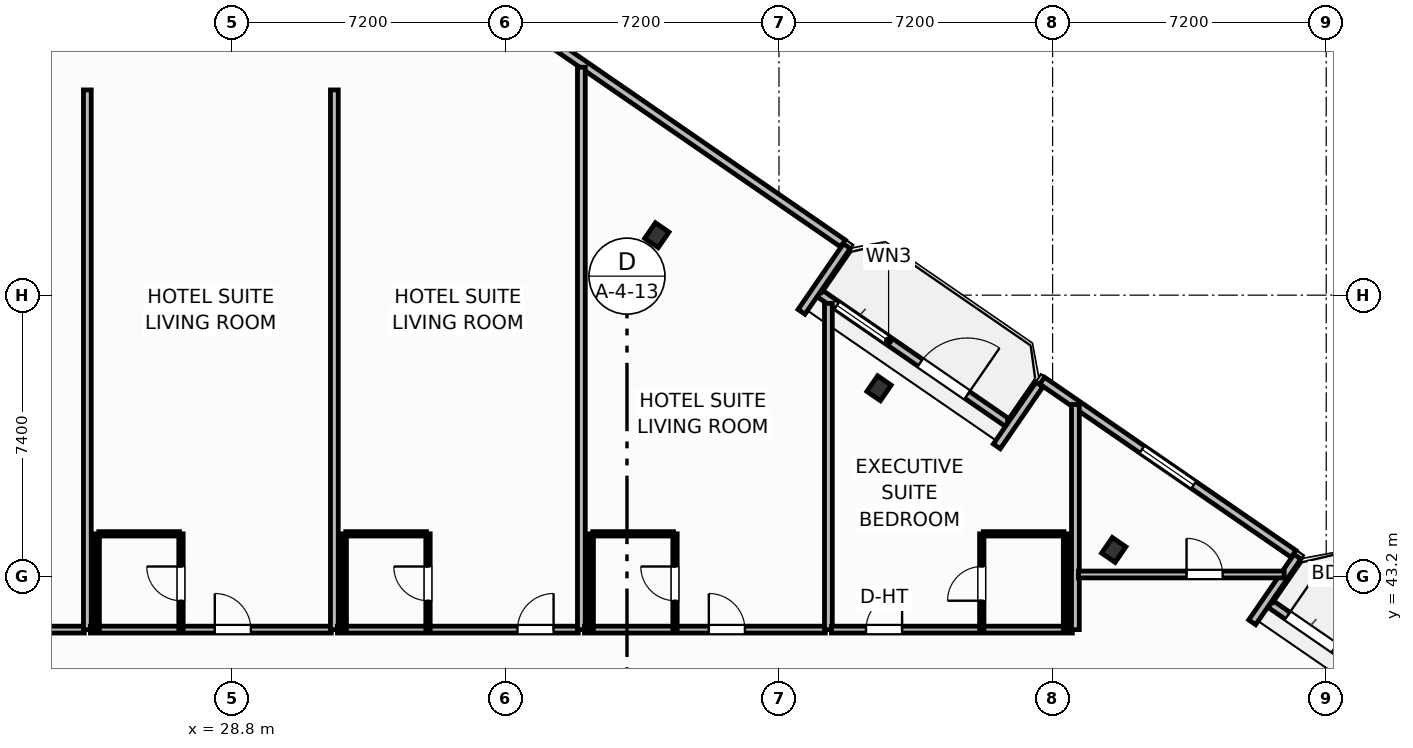
"""IFC4 building model, lengths in metres.
Left out: names, types, materials, properties, quantities, classifications, styles, units other than length and angle.
Written with IfcOpenShell. Run it as: python <this file> out.ifc"""

import sys

from ifc_helpers import new_model, si_unit, direction, frame, frame_2d, origin, origin_2d, place, context, subcontext, project, spatial, rectangle, i_section, extrude, element, fill, save


model = new_model("IFC4")
c1 = context("Model", 3, precision=1e-05, world=origin(), true_north=direction((0.0, 1.0)))
c2 = subcontext(c1, "Body", "Model", "MODEL_VIEW")
j1 = project(units=[si_unit("LENGTHUNIT", "METRE"), si_unit("PLANEANGLEUNIT", "RADIAN")], contexts=[c1])
p1 = place(None, origin())
s1 = spatial("IfcSite", under=j1, at=p1, CompositionType="ELEMENT")
p2 = place(p1, origin())
s2 = spatial("IfcBuilding", under=s1, at=p2, CompositionType="ELEMENT")
p3 = place(p2, frame((0.0, 0.0, 67.7)))
s3 = spatial("IfcBuildingStorey", under=s2, at=p3, CompositionType="ELEMENT", Elevation=67.7)
for number, where, z_axis, x_axis in (
    (1, (52.009, 43.896, 0.0), (0.0, 0.0, 1.0), (0.824, -0.567, 0.0)),
    (2, (45.833, 48.15, 0.0), (0.0, 0.0, 1.0), (0.824, -0.567, 0.0)),
    (3, (39.985, 52.177, 0.0), (0.0, 0.0, 1.0), (0.824, -0.567, 0.0)),
):
    element("IfcColumn", number, at=place(p3, frame(where, z_axis=z_axis, x_axis=x_axis)), inside=s3, PredefinedType="COLUMN", context=c2, shape_type="SweptSolid", body=[
        extrude(i_section(OverallWidth=0.432, OverallDepth=0.498, WebThickness=0.056, FlangeThickness=0.089, FilletRadius=0.025, at=origin_2d()), origin(), (0.0, 0.0, 1.0), 3.7),
    ])
p4 = place(p3, frame((44.273, 50.645, 0.0), z_axis=(0.0, 0.0, 1.0), x_axis=(0.823534636215, -0.567265989598, 0.0)))
e4 = element("IfcWall", 4, at=p4, inside=s3, PredefinedType="SOLIDWALL", context=c2, shape_type="SweptSolid", body=[
    extrude(rectangle(XDim=6.0, YDim=0.22, at=frame_2d((3.0, 0.0))), origin(), (0.0, 0.0, 1.0), 2.66),
])
p5 = place(p4, frame((3.212, 0.0, 0.0)))
e5 = element("IfcOpeningElement", 5, at=p5, cuts=e4, PredefinedType="OPENING", context=c2, shape_type="SweptSolid", body=[
    extrude(rectangle(XDim=1.5, YDim=2.25, at=frame_2d((0.75, 1.125))), frame((0.0, 0.12, 0.0), z_axis=(0.0, -1.0, 0.0), x_axis=(1.0, 0.0, 0.0)), (0.0, 0.0, 1.0), 0.24),
])
p6 = place(p4, frame((0.55, 0.0, 0.75)))
e6 = element("IfcOpeningElement", 6, at=p6, cuts=e4, PredefinedType="OPENING", context=c2, shape_type="SweptSolid", body=[
    extrude(rectangle(XDim=1.65, YDim=1.65, at=frame_2d((0.825, 0.825))), frame((0.0, 0.12, 0.0), z_axis=(0.0, -1.0, 0.0), x_axis=(1.0, 0.0, 0.0)), (0.0, 0.0, 1.0), 0.24),
])
p7 = place(p3, frame((56.132, 42.476, 0.0), z_axis=(0.0, 0.0, 1.0), x_axis=(0.823534636215, -0.567265989598, 0.0)))
e7 = element("IfcWall", 7, at=p7, inside=s3, PredefinedType="SOLIDWALL", context=c2, shape_type="SweptSolid", body=[
    extrude(rectangle(XDim=6.0, YDim=0.22, at=frame_2d((3.0, 0.0))), origin(), (0.0, 0.0, 1.0), 2.66),
])
p8 = place(p7, frame((0.548, 0.0, 0.0)))
e8 = element("IfcOpeningElement", 8, at=p8, cuts=e7, PredefinedType="OPENING", context=c2, shape_type="SweptSolid", body=[
    extrude(rectangle(XDim=1.5, YDim=2.25, at=frame_2d((0.75, 1.125))), frame((0.0, 0.12, 0.0), z_axis=(0.0, -1.0, 0.0), x_axis=(1.0, 0.0, 0.0)), (0.0, 0.0, 1.0), 0.24),
])
p9 = place(p3, frame((55.653, 41.993, 0.0), z_axis=(0.0, 0.0, 1.0), x_axis=(0.567273696173, 0.823529327729, 0.0)))
e9 = element("IfcWall", 9, at=p9, inside=s3, PredefinedType="SOLIDWALL", context=c2, shape_type="SweptSolid", body=[
    extrude(rectangle(XDim=2.1, YDim=0.22, at=frame_2d((1.05, 0.0))), origin(), (0.0, 0.0, 1.0), 2.66),
])
p10 = place(p3, frame((56.741, 43.793, 0.0), z_axis=(0.0, 0.0, 1.0), x_axis=(-0.823530942962, 0.56727135128, 0.0)))
e10 = element("IfcWall", 10, at=p10, inside=s3, PredefinedType="SOLIDWALL", context=c2, shape_type="SweptSolid", body=[
    extrude(rectangle(XDim=8.035, YDim=0.22, at=frame_2d((4.018, 0.0))), origin(), (0.0, 0.0, 1.0), 2.66),
])
p11 = place(p10, frame((3.192, 0.0, 0.8)))
e11 = element("IfcOpeningElement", 11, at=p11, cuts=e10, PredefinedType="OPENING", context=c2, shape_type="SweptSolid", body=[
    extrude(rectangle(XDim=1.65, YDim=1.65, at=frame_2d((0.825, 0.825))), frame((0.0, 0.12, 0.0), z_axis=(0.0, -1.0, 0.0), x_axis=(1.0, 0.0, 0.0)), (0.0, 0.0, 1.0), 0.24),
])
p12 = place(p3, frame((50.053, 48.248, 0.0), z_axis=(0.0, 0.0, 1.0), x_axis=(-0.567273565974, -0.823529417415, 0.0)))
e12 = element("IfcWall", 12, at=p12, inside=s3, PredefinedType="SOLIDWALL", context=c2, shape_type="SweptSolid", body=[
    extrude(rectangle(XDim=1.975, YDim=0.22, at=frame_2d((0.988, 0.0))), origin(), (0.0, 0.0, 1.0), 2.66),
])
p13 = place(p3, frame((43.794, 50.161, 0.0), z_axis=(0.0, 0.0, 1.0), x_axis=(0.567352541689, 0.823475010816, 0.0)))
e13 = element("IfcWall", 13, at=p13, inside=s3, PredefinedType="SOLIDWALL", context=c2, shape_type="SweptSolid", body=[
    extrude(rectangle(XDim=2.1, YDim=0.22, at=frame_2d((1.05, 0.0))), origin(), (0.0, 0.0, 1.0), 2.66),
])
p14 = place(p3, frame((44.882, 51.962, 0.0), z_axis=(0.0, 0.0, 1.0), x_axis=(-0.823534427573, 0.567266292497, 0.0)))
e14 = element("IfcWall", 14, at=p14, inside=s3, PredefinedType="SOLIDWALL", context=c2, shape_type="SweptSolid", body=[
    extrude(rectangle(XDim=23.147, YDim=0.22, at=frame_2d((11.574, 0.0))), origin(), (0.0, 0.0, 1.0), 2.66),
])
p15 = place(p14, frame((10.749, 0.0, 0.8)))
e15 = element("IfcOpeningElement", 15, at=p15, cuts=e14, PredefinedType="OPENING", context=c2, shape_type="SweptSolid", body=[
    extrude(rectangle(XDim=1.65, YDim=1.65, at=frame_2d((0.825, 0.825))), frame((0.0, 0.12, 0.0), z_axis=(0.0, -1.0, 0.0), x_axis=(1.0, 0.0, 0.0)), (0.0, 0.0, 1.0), 0.24),
])
p16 = place(p3, frame((3.176, 41.8, 0.0), z_axis=(0.0, 0.0, 1.0), x_axis=(1.0, 0.0, 0.0)))
e16 = element("IfcWall", 16, at=p16, inside=s3, PredefinedType="PARTITIONING", context=c2, shape_type="SweptSolid", body=[
    extrude(rectangle(XDim=21.744, YDim=0.18, at=frame_2d((10.872, 0.0))), origin(), (0.0, 0.0, 1.0), 3.38),
])
p17 = place(p16, frame((16.689, 0.0, 0.0)))
e17 = element("IfcOpeningElement", 17, at=p17, cuts=e16, PredefinedType="OPENING", context=c2, shape_type="SweptSolid", body=[
    extrude(rectangle(XDim=0.95, YDim=2.05, at=frame_2d((0.475, 1.025))), frame((0.0, 0.1, 0.0), z_axis=(0.0, -1.0, 0.0), x_axis=(1.0, 0.0, 0.0)), (0.0, 0.0, 1.0), 0.2),
])
p18 = place(p3, frame((25.0, 41.8, 0.0), z_axis=(0.0, 0.0, 1.0), x_axis=(0.0, 1.0, 0.0)))
e18 = element("IfcWall", 18, at=p18, inside=s3, PredefinedType="PARTITIONING", context=c2, shape_type="SweptSolid", body=[
    extrude(rectangle(XDim=14.2, YDim=0.205, at=frame_2d((7.1, 0.0))), origin(), (0.0, 0.0, 1.0), 3.38),
])
p19 = place(p3, frame((25.08, 41.8, 0.0), z_axis=(0.0, 0.0, 1.0), x_axis=(1.0, 0.0, 0.0)))
e19 = element("IfcWall", 19, at=p19, inside=s3, PredefinedType="PARTITIONING", context=c2, shape_type="SweptSolid", body=[
    extrude(rectangle(XDim=6.34, YDim=0.18, at=frame_2d((3.17, 0.0))), origin(), (0.0, 0.0, 1.0), 3.38),
])
p20 = place(p19, frame((3.274, 0.0, 0.0)))
e20 = element("IfcOpeningElement", 20, at=p20, cuts=e19, PredefinedType="OPENING", context=c2, shape_type="SweptSolid", body=[
    extrude(rectangle(XDim=0.95, YDim=2.15, at=frame_2d((0.475, 1.075))), frame((0.0, 0.1, 0.0), z_axis=(0.0, -1.0, 0.0), x_axis=(1.0, 0.0, 0.0)), (0.0, 0.0, 1.0), 0.2),
])
p21 = place(p3, frame((25.3, 44.32, 0.0), z_axis=(0.0, 0.0, 1.0), x_axis=(1.0, 0.0, 0.0)))
e21 = element("IfcWall", 21, at=p21, inside=s3, PredefinedType="PARTITIONING", context=c2, shape_type="SweptSolid", body=[
    extrude(rectangle(XDim=2.124, YDim=0.115, at=frame_2d((1.062, 0.0))), origin(), (0.0, 0.0, 1.0), 3.38),
])
p22 = place(p3, frame((27.464, 41.8, 0.0), z_axis=(0.0, 0.0, 1.0), x_axis=(0.0, 1.0, 0.0)))
e22 = element("IfcWall", 22, at=p22, inside=s3, PredefinedType="PARTITIONING", context=c2, shape_type="SweptSolid", body=[
    extrude(rectangle(XDim=2.52, YDim=0.115, at=frame_2d((1.26, 0.0))), origin(), (0.0, 0.0, 1.0), 3.38),
])
p23 = place(p22, frame((0.76, 0.0, 0.0)))
e23 = element("IfcOpeningElement", 23, at=p23, cuts=e22, PredefinedType="OPENING", context=c2, shape_type="SweptSolid", body=[
    extrude(rectangle(XDim=0.9, YDim=2.05, at=frame_2d((0.45, 1.025))), frame((0.0, 0.067, 0.0), z_axis=(0.0, -1.0, 0.0), x_axis=(1.0, 0.0, 0.0)), (0.0, 0.0, 1.0), 0.135),
])
p24 = place(p3, frame((25.26, 41.8, 0.0), z_axis=(0.0, 0.0, 1.0), x_axis=(0.0, 1.0, 0.0)))
e24 = element("IfcWall", 24, at=p24, inside=s3, PredefinedType="PARTITIONING", context=c2, shape_type="SweptSolid", body=[
    extrude(rectangle(XDim=2.52, YDim=0.115, at=frame_2d((1.26, 0.0))), origin(), (0.0, 0.0, 1.0), 3.38),
])
p25 = place(p3, frame((31.5, 41.8, 0.0), z_axis=(0.0, 0.0, 1.0), x_axis=(0.0, 1.0, 0.0)))
e25 = element("IfcWall", 25, at=p25, inside=s3, PredefinedType="PARTITIONING", context=c2, shape_type="SweptSolid", body=[
    extrude(rectangle(XDim=14.2, YDim=0.205, at=frame_2d((7.1, 0.0))), origin(), (0.0, 0.0, 1.0), 3.38),
])
p26 = place(p3, frame((31.58, 41.8, 0.0), z_axis=(0.0, 0.0, 1.0), x_axis=(1.0, 0.0, 0.0)))
e26 = element("IfcWall", 26, at=p26, inside=s3, PredefinedType="PARTITIONING", context=c2, shape_type="SweptSolid", body=[
    extrude(rectangle(XDim=6.34, YDim=0.18, at=frame_2d((3.17, 0.0))), origin(), (0.0, 0.0, 1.0), 3.38),
])
p27 = place(p26, frame((4.739, 0.0, 0.0)))
e27 = element("IfcOpeningElement", 27, at=p27, cuts=e26, PredefinedType="OPENING", context=c2, shape_type="SweptSolid", body=[
    extrude(rectangle(XDim=0.95, YDim=2.15, at=frame_2d((0.475, 1.075))), frame((0.0, 0.1, 0.0), z_axis=(0.0, -1.0, 0.0), x_axis=(1.0, 0.0, 0.0)), (0.0, 0.0, 1.0), 0.2),
])
p28 = place(p3, frame((31.8, 44.32, 0.0), z_axis=(0.0, 0.0, 1.0), x_axis=(1.0, 0.0, 0.0)))
e28 = element("IfcWall", 28, at=p28, inside=s3, PredefinedType="PARTITIONING", context=c2, shape_type="SweptSolid", body=[
    extrude(rectangle(XDim=2.124, YDim=0.115, at=frame_2d((1.062, 0.0))), origin(), (0.0, 0.0, 1.0), 3.38),
])
p29 = place(p3, frame((33.964, 41.8, 0.0), z_axis=(0.0, 0.0, 1.0), x_axis=(0.0, 1.0, 0.0)))
e29 = element("IfcWall", 29, at=p29, inside=s3, PredefinedType="PARTITIONING", context=c2, shape_type="SweptSolid", body=[
    extrude(rectangle(XDim=2.52, YDim=0.115, at=frame_2d((1.26, 0.0))), origin(), (0.0, 0.0, 1.0), 3.38),
])
p30 = place(p29, frame((0.76, 0.0, 0.0)))
e30 = element("IfcOpeningElement", 30, at=p30, cuts=e29, PredefinedType="OPENING", context=c2, shape_type="SweptSolid", body=[
    extrude(rectangle(XDim=0.9, YDim=2.05, at=frame_2d((0.45, 1.025))), frame((0.0, 0.067, 0.0), z_axis=(0.0, -1.0, 0.0), x_axis=(1.0, 0.0, 0.0)), (0.0, 0.0, 1.0), 0.135),
])
p31 = place(p3, frame((31.76, 41.8, 0.0), z_axis=(0.0, 0.0, 1.0), x_axis=(0.0, 1.0, 0.0)))
e31 = element("IfcWall", 31, at=p31, inside=s3, PredefinedType="PARTITIONING", context=c2, shape_type="SweptSolid", body=[
    extrude(rectangle(XDim=2.52, YDim=0.115, at=frame_2d((1.26, 0.0))), origin(), (0.0, 0.0, 1.0), 3.38),
])
p32 = place(p3, frame((38.0, 41.8, 0.0), z_axis=(0.0, 0.0, 1.0), x_axis=(0.0, 1.0, 0.0)))
e32 = element("IfcWall", 32, at=p32, inside=s3, PredefinedType="PARTITIONING", context=c2, shape_type="SweptSolid", body=[
    extrude(rectangle(XDim=14.797, YDim=0.205, at=frame_2d((7.398, 0.0))), origin(), (0.0, 0.0, 1.0), 3.38),
])
p33 = place(p3, frame((38.08, 41.8, 0.0), z_axis=(0.0, 0.0, 1.0), x_axis=(1.0, 0.0, 0.0)))
e33 = element("IfcWall", 33, at=p33, inside=s3, PredefinedType="PARTITIONING", context=c2, shape_type="SweptSolid", body=[
    extrude(rectangle(XDim=6.34, YDim=0.18, at=frame_2d((3.17, 0.0))), origin(), (0.0, 0.0, 1.0), 3.38),
])
p34 = place(p33, frame((3.274, 0.0, 0.0)))
e34 = element("IfcOpeningElement", 34, at=p34, cuts=e33, PredefinedType="OPENING", context=c2, shape_type="SweptSolid", body=[
    extrude(rectangle(XDim=0.95, YDim=2.15, at=frame_2d((0.475, 1.075))), frame((0.0, 0.1, 0.0), z_axis=(0.0, -1.0, 0.0), x_axis=(1.0, 0.0, 0.0)), (0.0, 0.0, 1.0), 0.2),
])
p35 = place(p3, frame((38.3, 44.32, 0.0), z_axis=(0.0, 0.0, 1.0), x_axis=(1.0, 0.0, 0.0)))
e35 = element("IfcWall", 35, at=p35, inside=s3, PredefinedType="PARTITIONING", context=c2, shape_type="SweptSolid", body=[
    extrude(rectangle(XDim=2.124, YDim=0.115, at=frame_2d((1.062, 0.0))), origin(), (0.0, 0.0, 1.0), 3.38),
])
p36 = place(p3, frame((40.464, 41.8, 0.0), z_axis=(0.0, 0.0, 1.0), x_axis=(0.0, 1.0, 0.0)))
e36 = element("IfcWall", 36, at=p36, inside=s3, PredefinedType="PARTITIONING", context=c2, shape_type="SweptSolid", body=[
    extrude(rectangle(XDim=2.52, YDim=0.115, at=frame_2d((1.26, 0.0))), origin(), (0.0, 0.0, 1.0), 3.38),
])
p37 = place(p36, frame((0.76, 0.0, 0.0)))
e37 = element("IfcOpeningElement", 37, at=p37, cuts=e36, PredefinedType="OPENING", context=c2, shape_type="SweptSolid", body=[
    extrude(rectangle(XDim=0.9, YDim=2.05, at=frame_2d((0.45, 1.025))), frame((0.0, 0.067, 0.0), z_axis=(0.0, -1.0, 0.0), x_axis=(1.0, 0.0, 0.0)), (0.0, 0.0, 1.0), 0.135),
])
p38 = place(p3, frame((38.26, 41.8, 0.0), z_axis=(0.0, 0.0, 1.0), x_axis=(0.0, 1.0, 0.0)))
e38 = element("IfcWall", 38, at=p38, inside=s3, PredefinedType="PARTITIONING", context=c2, shape_type="SweptSolid", body=[
    extrude(rectangle(XDim=2.52, YDim=0.115, at=frame_2d((1.26, 0.0))), origin(), (0.0, 0.0, 1.0), 3.38),
])
p39 = place(p3, frame((44.5, 41.8, 0.0), z_axis=(0.0, 0.0, 1.0), x_axis=(0.0, 1.0, 0.0)))
e39 = element("IfcWall", 39, at=p39, inside=s3, PredefinedType="PARTITIONING", context=c2, shape_type="SweptSolid", body=[
    extrude(rectangle(XDim=8.583, YDim=0.205, at=frame_2d((4.292, 0.0))), origin(), (0.0, 0.0, 1.0), 3.38),
])
p40 = place(p3, frame((44.58, 41.8, 0.0), z_axis=(0.0, 0.0, 1.0), x_axis=(1.0, 0.0, 0.0)))
e40 = element("IfcWall", 40, at=p40, inside=s3, PredefinedType="PARTITIONING", context=c2, shape_type="SweptSolid", body=[
    extrude(rectangle(XDim=6.34, YDim=0.18, at=frame_2d((3.17, 0.0))), origin(), (0.0, 0.0, 1.0), 3.38),
])
p41 = place(p40, frame((0.91, 0.0, 0.0)))
e41 = element("IfcOpeningElement", 41, at=p41, cuts=e40, PredefinedType="OPENING", context=c2, shape_type="SweptSolid", body=[
    extrude(rectangle(XDim=0.95, YDim=2.15, at=frame_2d((0.475, 1.075))), frame((0.0, 0.1, 0.0), z_axis=(0.0, -1.0, 0.0), x_axis=(1.0, 0.0, 0.0)), (0.0, 0.0, 1.0), 0.2),
])
p42 = place(p3, frame((48.576, 44.32, 0.0), z_axis=(0.0, 0.0, 1.0), x_axis=(1.0, 0.0, 0.0)))
e42 = element("IfcWall", 42, at=p42, inside=s3, PredefinedType="PARTITIONING", context=c2, shape_type="SweptSolid", body=[
    extrude(rectangle(XDim=2.124, YDim=0.115, at=frame_2d((1.062, 0.0))), origin(), (0.0, 0.0, 1.0), 3.38),
])
p43 = place(p3, frame((48.536, 41.8, 0.0), z_axis=(0.0, 0.0, 1.0), x_axis=(0.0, 1.0, 0.0)))
e43 = element("IfcWall", 43, at=p43, inside=s3, PredefinedType="PARTITIONING", context=c2, shape_type="SweptSolid", body=[
    extrude(rectangle(XDim=2.52, YDim=0.115, at=frame_2d((1.26, 0.0))), origin(), (0.0, 0.0, 1.0), 3.38),
])
p44 = place(p43, frame((0.76, 0.0, 0.0)))
e44 = element("IfcOpeningElement", 44, at=p44, cuts=e43, PredefinedType="OPENING", context=c2, shape_type="SweptSolid", body=[
    extrude(rectangle(XDim=0.9, YDim=2.05, at=frame_2d((0.45, 1.025))), frame((0.0, 0.067, 0.0), z_axis=(0.0, -1.0, 0.0), x_axis=(1.0, 0.0, 0.0)), (0.0, 0.0, 1.0), 0.135),
])
p45 = place(p3, frame((50.74, 41.8, 0.0), z_axis=(0.0, 0.0, 1.0), x_axis=(0.0, 1.0, 0.0)))
e45 = element("IfcWall", 45, at=p45, inside=s3, PredefinedType="PARTITIONING", context=c2, shape_type="SweptSolid", body=[
    extrude(rectangle(XDim=2.52, YDim=0.115, at=frame_2d((1.26, 0.0))), origin(), (0.0, 0.0, 1.0), 3.38),
])
p46 = place(p3, frame((51.0, 41.8, 0.0), z_axis=(0.0, 0.0, 1.0), x_axis=(0.0, 1.0, 0.0)))
e46 = element("IfcWall", 46, at=p46, inside=s3, PredefinedType="PARTITIONING", context=c2, shape_type="SweptSolid", body=[
    extrude(rectangle(XDim=5.923, YDim=0.205, at=frame_2d((2.961, 0.0))), origin(), (0.0, 0.0, 1.0), 3.38),
])
p47 = place(p3, frame((51.08, 43.25, 0.0), z_axis=(0.0, 0.0, 1.0), x_axis=(1.0, 0.0, 0.0)))
e47 = element("IfcWall", 47, at=p47, inside=s3, PredefinedType="PARTITIONING", context=c2, shape_type="SweptSolid", body=[
    extrude(rectangle(XDim=5.414, YDim=0.18, at=frame_2d((2.707, 0.0))), origin(), (0.0, 0.0, 1.0), 3.38),
])
p48 = place(p47, frame((2.844, 0.0, 0.0)))
e48 = element("IfcOpeningElement", 48, at=p48, cuts=e47, PredefinedType="OPENING", context=c2, shape_type="SweptSolid", body=[
    extrude(rectangle(XDim=0.95, YDim=2.05, at=frame_2d((0.475, 1.025))), frame((0.0, 0.1, 0.0), z_axis=(0.0, -1.0, 0.0), x_axis=(1.0, 0.0, 0.0)), (0.0, 0.0, 1.0), 0.2),
])
p49 = place(p5, origin())
e49 = element("IfcDoor", 49, at=p49, inside=s3, OperationType="SINGLE_SWING_RIGHT", PredefinedType="DOOR", context=c2, shape_type="SweptSolid", body=[
    extrude(rectangle(XDim=1.5, YDim=2.25, at=frame_2d((0.75, 1.125))), frame((0.0, 0.025, 0.0), z_axis=(0.0, -1.0, 0.0), x_axis=(1.0, 0.0, 0.0)), (0.0, 0.0, 1.0), 0.05),
])
fill(e5, e49)
p50 = place(p6, origin())
e50 = element("IfcWindow", 50, at=p50, inside=s3, PartitioningType="SINGLE_PANEL", PredefinedType="WINDOW", context=c2, shape_type="SweptSolid", body=[
    extrude(rectangle(XDim=1.65, YDim=1.65, at=frame_2d((0.825, 0.825))), frame((0.0, 0.03, 0.0), z_axis=(0.0, -1.0, 0.0), x_axis=(1.0, 0.0, 0.0)), (0.0, 0.0, 1.0), 0.06),
])
fill(e6, e50)
p51 = place(p8, origin())
e51 = element("IfcDoor", 51, at=p51, inside=s3, OperationType="SINGLE_SWING_LEFT", PredefinedType="DOOR", context=c2, shape_type="SweptSolid", body=[
    extrude(rectangle(XDim=1.5, YDim=2.25, at=frame_2d((0.75, 1.125))), frame((0.0, 0.025, 0.0), z_axis=(0.0, -1.0, 0.0), x_axis=(1.0, 0.0, 0.0)), (0.0, 0.0, 1.0), 0.05),
])
fill(e8, e51)
p52 = place(p11, origin())
e52 = element("IfcWindow", 52, at=p52, inside=s3, PartitioningType="SINGLE_PANEL", PredefinedType="WINDOW", context=c2, shape_type="SweptSolid", body=[
    extrude(rectangle(XDim=1.65, YDim=1.65, at=frame_2d((0.825, 0.825))), frame((0.0, 0.03, 0.0), z_axis=(0.0, -1.0, 0.0), x_axis=(1.0, 0.0, 0.0)), (0.0, 0.0, 1.0), 0.06),
])
fill(e11, e52)
p53 = place(p20, origin())
e53 = element("IfcDoor", 53, at=p53, inside=s3, OperationType="SINGLE_SWING_LEFT", PredefinedType="DOOR", context=c2, shape_type="SweptSolid", body=[
    extrude(rectangle(XDim=0.95, YDim=2.15, at=frame_2d((0.475, 1.075))), frame((0.0, 0.025, 0.0), z_axis=(0.0, -1.0, 0.0), x_axis=(1.0, 0.0, 0.0)), (0.0, 0.0, 1.0), 0.05),
])
fill(e20, e53)
p54 = place(p23, origin())
e54 = element("IfcDoor", 54, at=p54, inside=s3, OperationType="SINGLE_SWING_RIGHT", PredefinedType="DOOR", context=c2, shape_type="SweptSolid", body=[
    extrude(rectangle(XDim=0.9, YDim=2.05, at=frame_2d((0.45, 1.025))), frame((0.0, 0.025, 0.0), z_axis=(0.0, -1.0, 0.0), x_axis=(1.0, 0.0, 0.0)), (0.0, 0.0, 1.0), 0.05),
])
fill(e23, e54)
p55 = place(p27, origin())
e55 = element("IfcDoor", 55, at=p55, inside=s3, OperationType="SINGLE_SWING_RIGHT", PredefinedType="DOOR", context=c2, shape_type="SweptSolid", body=[
    extrude(rectangle(XDim=0.95, YDim=2.15, at=frame_2d((0.475, 1.075))), frame((0.0, 0.025, 0.0), z_axis=(0.0, -1.0, 0.0), x_axis=(1.0, 0.0, 0.0)), (0.0, 0.0, 1.0), 0.05),
])
fill(e27, e55)
p56 = place(p30, origin())
e56 = element("IfcDoor", 56, at=p56, inside=s3, OperationType="SINGLE_SWING_RIGHT", PredefinedType="DOOR", context=c2, shape_type="SweptSolid", body=[
    extrude(rectangle(XDim=0.9, YDim=2.05, at=frame_2d((0.45, 1.025))), frame((0.0, 0.025, 0.0), z_axis=(0.0, -1.0, 0.0), x_axis=(1.0, 0.0, 0.0)), (0.0, 0.0, 1.0), 0.05),
])
fill(e30, e56)
p57 = place(p34, origin())
e57 = element("IfcDoor", 57, at=p57, inside=s3, OperationType="SINGLE_SWING_LEFT", PredefinedType="DOOR", context=c2, shape_type="SweptSolid", body=[
    extrude(rectangle(XDim=0.95, YDim=2.15, at=frame_2d((0.475, 1.075))), frame((0.0, 0.025, 0.0), z_axis=(0.0, -1.0, 0.0), x_axis=(1.0, 0.0, 0.0)), (0.0, 0.0, 1.0), 0.05),
])
fill(e34, e57)
p58 = place(p37, origin())
e58 = element("IfcDoor", 58, at=p58, inside=s3, OperationType="SINGLE_SWING_RIGHT", PredefinedType="DOOR", context=c2, shape_type="SweptSolid", body=[
    extrude(rectangle(XDim=0.9, YDim=2.05, at=frame_2d((0.45, 1.025))), frame((0.0, 0.025, 0.0), z_axis=(0.0, -1.0, 0.0), x_axis=(1.0, 0.0, 0.0)), (0.0, 0.0, 1.0), 0.05),
])
fill(e37, e58)
p59 = place(p41, origin())
e59 = element("IfcDoor", 59, at=p59, inside=s3, OperationType="SINGLE_SWING_RIGHT", PredefinedType="DOOR", context=c2, shape_type="SweptSolid", body=[
    extrude(rectangle(XDim=0.95, YDim=2.15, at=frame_2d((0.475, 1.075))), frame((0.0, 0.025, 0.0), z_axis=(0.0, -1.0, 0.0), x_axis=(1.0, 0.0, 0.0)), (0.0, 0.0, 1.0), 0.05),
])
fill(e41, e59)
p60 = place(p44, origin())
e60 = element("IfcDoor", 60, at=p60, inside=s3, OperationType="SINGLE_SWING_LEFT", PredefinedType="DOOR", context=c2, shape_type="SweptSolid", body=[
    extrude(rectangle(XDim=0.9, YDim=2.05, at=frame_2d((0.45, 1.025))), frame((0.0, 0.025, 0.0), z_axis=(0.0, -1.0, 0.0), x_axis=(1.0, 0.0, 0.0)), (0.0, 0.0, 1.0), 0.05),
])
fill(e44, e60)
p61 = place(p48, origin())
e61 = element("IfcDoor", 61, at=p61, inside=s3, OperationType="SINGLE_SWING_LEFT", PredefinedType="DOOR", context=c2, shape_type="SweptSolid", body=[
    extrude(rectangle(XDim=0.95, YDim=2.05, at=frame_2d((0.475, 1.025))), frame((0.0, 0.025, 0.0), z_axis=(0.0, -1.0, 0.0), x_axis=(1.0, 0.0, 0.0)), (0.0, 0.0, 1.0), 0.05),
])
fill(e48, e61)
save(model, sys.argv[1])
